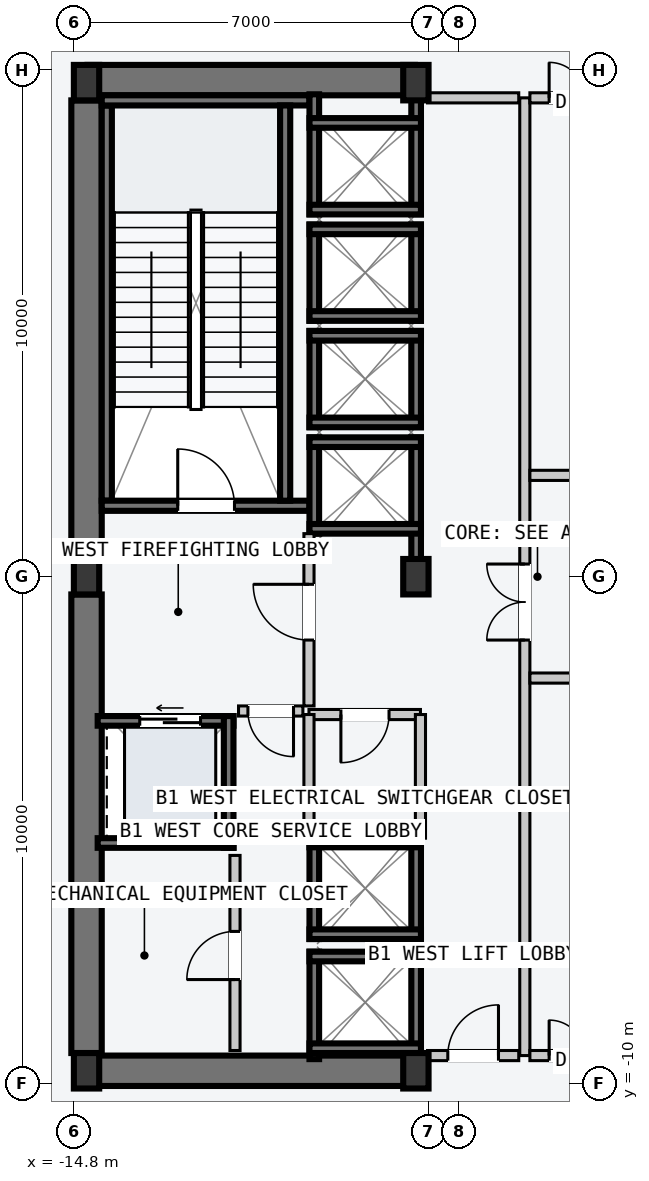
"""IFC4 building model, lengths in metres.
Left out: names, types, materials, properties, quantities, classifications, styles, units other than length and angle.
Written with IfcOpenShell. Run it as: python <this file> out.ifc"""

import sys

from ifc_helpers import new_model, si_unit, direction, frame, frame_2d, origin, origin_2d, place, context, subcontext, project, spatial, rectangle, i_section, extrude, element, fill, save


model = new_model("IFC4")
c1 = context("Model", 3, precision=1e-05, world=origin(), true_north=direction((0.0, 1.0)))
c2 = subcontext(c1, "Body", "Model", "MODEL_VIEW")
j1 = project(units=[si_unit("LENGTHUNIT", "METRE"), si_unit("PLANEANGLEUNIT", "RADIAN")], contexts=[c1])
p1 = place(None, origin())
s1 = spatial("IfcSite", under=j1, at=p1, CompositionType="ELEMENT")
p2 = place(p1, origin())
s2 = spatial("IfcBuilding", under=s1, at=p2, CompositionType="ELEMENT")
p3 = place(p2, frame((0.0, 0.0, -4.8)))
s3 = spatial("IfcBuildingStorey", under=s2, at=p3, CompositionType="ELEMENT", Elevation=-4.8)
for number, where, z_axis, x_axis in (
    (1, (-14.53, -9.75, -0.22), (0.0, 0.0, 1.0), (1.0, 0.0, 0.0)),
    (2, (-14.53, 9.8, -0.22), (0.0, 0.0, 1.0), (1.0, 0.0, 0.0)),
):
    element("IfcWall", number, at=place(p3, frame(where, z_axis=z_axis, x_axis=x_axis)), inside=s3, PredefinedType="SHEAR", context=c2, shape_type="SweptSolid", body=[
        extrude(rectangle(XDim=6.46, YDim=0.6, at=frame_2d((3.23, 0.0))), origin(), (0.0, 0.0, 1.0), 4.8),
    ])
for number, where, z_axis, x_axis in (
    (3, (-14.55, -9.4, -0.22), (0.0, 0.0, 1.0), (0.0, 1.0, 0.0)),
    (4, (-14.55, 0.35, -0.22), (0.0, 0.0, 1.0), (0.0, 1.0, 0.0)),
):
    element("IfcWall", number, at=place(p3, frame(where, z_axis=z_axis, x_axis=x_axis)), inside=s3, PredefinedType="SHEAR", context=c2, shape_type="SweptSolid", body=[
        extrude(rectangle(XDim=9.05, YDim=0.6, at=frame_2d((4.525, 0.0))), origin(), (0.0, 0.0, 1.0), 4.8),
    ])
p4 = place(p3, frame((-14.15, 1.5, -0.22), z_axis=(0.0, 0.0, 1.0), x_axis=(0.0, 1.0, 0.0)))
e5 = element("IfcWall", 5, at=p4, inside=s3, PredefinedType="SOLIDWALL", context=c2, shape_type="SweptSolid", body=[
    extrude(rectangle(XDim=7.8, YDim=0.2, at=frame_2d((3.9, 0.0))), origin(), (0.0, 0.0, 1.0), 4.8),
])
p5 = place(p3, frame((-14.25, 1.4, -0.22), z_axis=(0.0, 0.0, 1.0), x_axis=(1.0, 0.0, 0.0)))
e6 = element("IfcWall", 6, at=p5, inside=s3, PredefinedType="SOLIDWALL", context=c2, shape_type="SweptSolid", body=[
    extrude(rectangle(XDim=4.1, YDim=0.2, at=frame_2d((2.05, 0.0))), origin(), (0.0, 0.0, 1.0), 4.8),
])
p6 = place(p5, frame((1.5, 0.0, 0.22)))
e7 = element("IfcOpeningElement", 7, at=p6, cuts=e6, PredefinedType="OPENING", context=c2, shape_type="SweptSolid", body=[
    extrude(rectangle(XDim=1.12, YDim=2.18, at=frame_2d((0.56, 1.09))), frame((0.0, 0.11, 0.0), z_axis=(0.0, -1.0, 0.0), x_axis=(1.0, 0.0, 0.0)), (0.0, 0.0, 1.0), 0.22),
])
p7 = place(p3, frame((-14.25, 9.4, -0.22), z_axis=(0.0, 0.0, 1.0), x_axis=(1.0, 0.0, 0.0)))
e8 = element("IfcWall", 8, at=p7, inside=s3, PredefinedType="SOLIDWALL", context=c2, shape_type="SweptSolid", body=[
    extrude(rectangle(XDim=4.1, YDim=0.2, at=frame_2d((2.05, 0.0))), origin(), (0.0, 0.0, 1.0), 4.8),
])
p8 = place(p3, frame((-10.63, 1.5, -0.22), z_axis=(0.0, 0.0, 1.0), x_axis=(0.0, 1.0, 0.0)))
e9 = element("IfcWall", 9, at=p8, inside=s3, PredefinedType="SOLIDWALL", context=c2, shape_type="SweptSolid", body=[
    extrude(rectangle(XDim=7.8, YDim=0.2, at=frame_2d((3.9, 0.0))), origin(), (0.0, 0.0, 1.0), 4.8),
])
for number, where, z_axis, x_axis in (
    (10, (-14.55, -9.75, 0.0), (0.0, 0.0, 1.0), (1.0, 0.0, 0.0)),
    (11, (-14.55, 0.0, 0.0), (0.0, 0.0, 1.0), (1.0, 0.0, 0.0)),
    (12, (-14.55, 9.75, 0.0), (0.0, 0.0, 1.0), (1.0, 0.0, 0.0)),
    (13, (-8.05, -9.75, 0.0), (0.0, 0.0, 1.0), (1.0, 0.0, 0.0)),
    (14, (-8.05, 0.0, 0.0), (0.0, 0.0, 1.0), (1.0, 0.0, 0.0)),
    (15, (-8.05, 9.75, 0.0), (0.0, 0.0, 1.0), (1.0, 0.0, 0.0)),
):
    element("IfcColumn", number, at=place(p3, frame(where, z_axis=z_axis, x_axis=x_axis)), inside=s3, PredefinedType="COLUMN", context=c2, shape_type="SweptSolid", body=[
        extrude(i_section(OverallWidth=0.5, OverallDepth=0.7, WebThickness=0.028, FlangeThickness=0.045, at=origin_2d()), origin(), (0.0, 0.0, 1.0), 4.8),
    ])
p9 = place(p3, frame((-8.045, 0.21, -0.22), z_axis=(0.0, 0.0, 1.0), x_axis=(0.0, 1.0, 0.0)))
e16 = element("IfcWall", 16, at=p9, inside=s3, PredefinedType="SOLIDWALL", context=c2, shape_type="SweptSolid", body=[
    extrude(rectangle(XDim=2.54, YDim=0.19, at=frame_2d((1.27, 0.0))), origin(), (0.0, 0.0, 1.0), 4.8),
])
p10 = place(p3, frame((-10.055, 0.85, -0.22), z_axis=(0.0, 0.0, 1.0), x_axis=(0.0, 1.0, 0.0)))
e17 = element("IfcWall", 17, at=p10, inside=s3, PredefinedType="SOLIDWALL", context=c2, shape_type="SweptSolid", body=[
    extrude(rectangle(XDim=1.9, YDim=0.19, at=frame_2d((0.95, 0.0))), origin(), (0.0, 0.0, 1.0), 4.8),
])
for number, where, z_axis, x_axis in (
    (18, (-10.15, 2.655, -0.22), (0.0, 0.0, 1.0), (1.0, 0.0, 0.0)),
    (19, (-10.15, 0.945, -0.22), (0.0, 0.0, 1.0), (1.0, 0.0, 0.0)),
):
    element("IfcWall", number, at=place(p3, frame(where, z_axis=z_axis, x_axis=x_axis)), inside=s3, PredefinedType="SOLIDWALL", context=c2, shape_type="SweptSolid", body=[
        extrude(rectangle(XDim=2.2, YDim=0.19, at=frame_2d((1.1, 0.0))), origin(), (0.0, 0.0, 1.0), 4.8),
    ])
for number, where, z_axis, x_axis in (
    (20, (-8.045, 2.95, -0.22), (0.0, 0.0, 1.0), (0.0, 1.0, 0.0)),
    (21, (-10.055, 2.95, -0.22), (0.0, 0.0, 1.0), (0.0, 1.0, 0.0)),
):
    element("IfcWall", number, at=place(p3, frame(where, z_axis=z_axis, x_axis=x_axis)), inside=s3, PredefinedType="SOLIDWALL", context=c2, shape_type="SweptSolid", body=[
        extrude(rectangle(XDim=1.9, YDim=0.19, at=frame_2d((0.95, 0.0))), origin(), (0.0, 0.0, 1.0), 4.8),
    ])
for number, where, z_axis, x_axis in (
    (22, (-10.15, 4.755, -0.22), (0.0, 0.0, 1.0), (1.0, 0.0, 0.0)),
    (23, (-10.15, 3.045, -0.22), (0.0, 0.0, 1.0), (1.0, 0.0, 0.0)),
):
    element("IfcWall", number, at=place(p3, frame(where, z_axis=z_axis, x_axis=x_axis)), inside=s3, PredefinedType="SOLIDWALL", context=c2, shape_type="SweptSolid", body=[
        extrude(rectangle(XDim=2.2, YDim=0.19, at=frame_2d((1.1, 0.0))), origin(), (0.0, 0.0, 1.0), 4.8),
    ])
for number, where, z_axis, x_axis in (
    (24, (-8.045, 5.05, -0.22), (0.0, 0.0, 1.0), (0.0, 1.0, 0.0)),
    (25, (-10.055, 5.05, -0.22), (0.0, 0.0, 1.0), (0.0, 1.0, 0.0)),
):
    element("IfcWall", number, at=place(p3, frame(where, z_axis=z_axis, x_axis=x_axis)), inside=s3, PredefinedType="SOLIDWALL", context=c2, shape_type="SweptSolid", body=[
        extrude(rectangle(XDim=1.9, YDim=0.19, at=frame_2d((0.95, 0.0))), origin(), (0.0, 0.0, 1.0), 4.8),
    ])
for number, where, z_axis, x_axis in (
    (26, (-10.15, 6.855, -0.22), (0.0, 0.0, 1.0), (1.0, 0.0, 0.0)),
    (27, (-10.15, 5.145, -0.22), (0.0, 0.0, 1.0), (1.0, 0.0, 0.0)),
):
    element("IfcWall", number, at=place(p3, frame(where, z_axis=z_axis, x_axis=x_axis)), inside=s3, PredefinedType="SOLIDWALL", context=c2, shape_type="SweptSolid", body=[
        extrude(rectangle(XDim=2.2, YDim=0.19, at=frame_2d((1.1, 0.0))), origin(), (0.0, 0.0, 1.0), 4.8),
    ])
for number, where, z_axis, x_axis in (
    (28, (-8.045, 7.15, -0.22), (0.0, 0.0, 1.0), (0.0, 1.0, 0.0)),
    (29, (-10.055, 7.15, -0.22), (0.0, 0.0, 1.0), (0.0, 1.0, 0.0)),
):
    element("IfcWall", number, at=place(p3, frame(where, z_axis=z_axis, x_axis=x_axis)), inside=s3, PredefinedType="SOLIDWALL", context=c2, shape_type="SweptSolid", body=[
        extrude(rectangle(XDim=2.37, YDim=0.19, at=frame_2d((1.185, 0.0))), origin(), (0.0, 0.0, 1.0), 4.8),
    ])
for number, where, z_axis, x_axis in (
    (30, (-10.15, 8.955, -0.22), (0.0, 0.0, 1.0), (1.0, 0.0, 0.0)),
    (31, (-10.15, 7.245, -0.22), (0.0, 0.0, 1.0), (1.0, 0.0, 0.0)),
):
    element("IfcWall", number, at=place(p3, frame(where, z_axis=z_axis, x_axis=x_axis)), inside=s3, PredefinedType="SOLIDWALL", context=c2, shape_type="SweptSolid", body=[
        extrude(rectangle(XDim=2.2, YDim=0.19, at=frame_2d((1.1, 0.0))), origin(), (0.0, 0.0, 1.0), 4.8),
    ])
for number, where, z_axis, x_axis in (
    (32, (-8.045, -9.52, -0.22), (0.0, 0.0, 1.0), (0.0, 1.0, 0.0)),
    (33, (-10.055, -9.52, -0.22), (0.0, 0.0, 1.0), (0.0, 1.0, 0.0)),
):
    element("IfcWall", number, at=place(p3, frame(where, z_axis=z_axis, x_axis=x_axis)), inside=s3, PredefinedType="SOLIDWALL", context=c2, shape_type="SweptSolid", body=[
        extrude(rectangle(XDim=2.12, YDim=0.19, at=frame_2d((1.06, 0.0))), origin(), (0.0, 0.0, 1.0), 4.8),
    ])
for number, where, z_axis, x_axis in (
    (34, (-10.15, -7.495, -0.22), (0.0, 0.0, 1.0), (1.0, 0.0, 0.0)),
    (35, (-10.15, -9.305, -0.22), (0.0, 0.0, 1.0), (1.0, 0.0, 0.0)),
):
    element("IfcWall", number, at=place(p3, frame(where, z_axis=z_axis, x_axis=x_axis)), inside=s3, PredefinedType="SOLIDWALL", context=c2, shape_type="SweptSolid", body=[
        extrude(rectangle(XDim=2.2, YDim=0.19, at=frame_2d((1.1, 0.0))), origin(), (0.0, 0.0, 1.0), 4.8),
    ])
for number, where, z_axis, x_axis in (
    (36, (-8.045, -7.15, -0.22), (0.0, 0.0, 1.0), (0.0, 1.0, 0.0)),
    (37, (-10.055, -7.15, -0.22), (0.0, 0.0, 1.0), (0.0, 1.0, 0.0)),
):
    element("IfcWall", number, at=place(p3, frame(where, z_axis=z_axis, x_axis=x_axis)), inside=s3, PredefinedType="SOLIDWALL", context=c2, shape_type="SweptSolid", body=[
        extrude(rectangle(XDim=2.0, YDim=0.19, at=frame_2d((1.0, 0.0))), origin(), (0.0, 0.0, 1.0), 4.8),
    ])
for number, where, z_axis, x_axis in (
    (38, (-10.15, -5.245, -0.22), (0.0, 0.0, 1.0), (1.0, 0.0, 0.0)),
    (39, (-10.15, -7.055, -0.22), (0.0, 0.0, 1.0), (1.0, 0.0, 0.0)),
):
    element("IfcWall", number, at=place(p3, frame(where, z_axis=z_axis, x_axis=x_axis)), inside=s3, PredefinedType="SOLIDWALL", context=c2, shape_type="SweptSolid", body=[
        extrude(rectangle(XDim=2.2, YDim=0.19, at=frame_2d((1.1, 0.0))), origin(), (0.0, 0.0, 1.0), 4.8),
    ])
p11 = place(p3, frame((-14.33, -2.845, -0.22), z_axis=(0.0, 0.0, 1.0), x_axis=(1.0, 0.0, 0.0)))
e40 = element("IfcWall", 40, at=p11, inside=s3, PredefinedType="SOLIDWALL", context=c2, shape_type="SweptSolid", body=[
    extrude(rectangle(XDim=2.68, YDim=0.19, at=frame_2d((1.34, 0.0))), origin(), (0.0, 0.0, 1.0), 4.8),
])
p12 = place(p11, frame((0.83, 0.0, 0.22)))
e41 = element("IfcOpeningElement", 41, at=p12, cuts=e40, PredefinedType="OPENING", context=c2, shape_type="SweptSolid", body=[
    extrude(rectangle(XDim=1.2, YDim=2.2, at=frame_2d((0.6, 1.1))), frame((0.0, 0.105, 0.0), z_axis=(0.0, -1.0, 0.0), x_axis=(1.0, 0.0, 0.0)), (0.0, 0.0, 1.0), 0.21),
])
p13 = place(p3, frame((-14.33, -5.255, -0.22), z_axis=(0.0, 0.0, 1.0), x_axis=(1.0, 0.0, 0.0)))
e42 = element("IfcWall", 42, at=p13, inside=s3, PredefinedType="SOLIDWALL", context=c2, shape_type="SweptSolid", body=[
    extrude(rectangle(XDim=2.68, YDim=0.19, at=frame_2d((1.34, 0.0))), origin(), (0.0, 0.0, 1.0), 4.8),
])
p14 = place(p3, frame((-11.745, -5.35, -0.22), z_axis=(0.0, 0.0, 1.0), x_axis=(0.0, 1.0, 0.0)))
e43 = element("IfcWall", 43, at=p14, inside=s3, PredefinedType="SOLIDWALL", context=c2, shape_type="SweptSolid", body=[
    extrude(rectangle(XDim=2.6, YDim=0.19, at=frame_2d((1.3, 0.0))), origin(), (0.0, 0.0, 1.0), 4.8),
])
p15 = place(p3, frame((-5.9, -9.45, 0.0), z_axis=(0.0, 0.0, 1.0), x_axis=(0.0, 1.0, 0.0)))
e44 = element("IfcWall", 44, at=p15, inside=s3, PredefinedType="PARTITIONING", context=c2, shape_type="SweptSolid", body=[
    extrude(rectangle(XDim=18.9, YDim=0.2, at=frame_2d((9.45, 0.0))), origin(), (0.0, 0.0, 1.0), 4.58),
])
p16 = place(p15, frame((8.2, 0.0, 0.0)))
e45 = element("IfcOpeningElement", 45, at=p16, cuts=e44, PredefinedType="OPENING", context=c2, shape_type="SweptSolid", body=[
    extrude(rectangle(XDim=1.5, YDim=2.2, at=frame_2d((0.75, 1.1))), frame((0.0, 0.11, 0.0), z_axis=(0.0, -1.0, 0.0), x_axis=(1.0, 0.0, 0.0)), (0.0, 0.0, 1.0), 0.22),
])
p17 = place(p3, frame((-6.02, 9.45, 0.0), z_axis=(0.0, 0.0, 1.0), x_axis=(-1.0, 0.0, 0.0)))
e46 = element("IfcWall", 46, at=p17, inside=s3, PredefinedType="PARTITIONING", context=c2, shape_type="SweptSolid", body=[
    extrude(rectangle(XDim=1.8, YDim=0.2, at=frame_2d((0.9, 0.0))), origin(), (0.0, 0.0, 1.0), 4.58),
])
p18 = place(p3, frame((-10.16, -2.55, 0.0), z_axis=(0.0, 0.0, 1.0), x_axis=(0.0, 1.0, 0.0)))
e47 = element("IfcWall", 47, at=p18, inside=s3, PredefinedType="PARTITIONING", context=c2, shape_type="SweptSolid", body=[
    extrude(rectangle(XDim=3.4, YDim=0.2, at=frame_2d((1.7, 0.0))), origin(), (0.0, 0.0, 1.0), 4.58),
])
p19 = place(p18, frame((1.3, 0.0, 0.0)))
e48 = element("IfcOpeningElement", 48, at=p19, cuts=e47, PredefinedType="OPENING", context=c2, shape_type="SweptSolid", body=[
    extrude(rectangle(XDim=1.1, YDim=2.15, at=frame_2d((0.55, 1.075))), frame((0.0, 0.11, 0.0), z_axis=(0.0, -1.0, 0.0), x_axis=(1.0, 0.0, 0.0)), (0.0, 0.0, 1.0), 0.22),
])
p20 = place(p3, frame((-10.28, -2.65, 0.0), z_axis=(0.0, 0.0, 1.0), x_axis=(-1.0, 0.0, 0.0)))
e49 = element("IfcWall", 49, at=p20, inside=s3, PredefinedType="PARTITIONING", context=c2, shape_type="SweptSolid", body=[
    extrude(rectangle(XDim=1.27, YDim=0.2, at=frame_2d((0.635, 0.0))), origin(), (0.0, 0.0, 1.0), 4.58),
])
p21 = place(p20, frame((0.185, 0.0, 0.0)))
e50 = element("IfcOpeningElement", 50, at=p21, cuts=e49, PredefinedType="OPENING", context=c2, shape_type="SweptSolid", body=[
    extrude(rectangle(XDim=0.9, YDim=2.15, at=frame_2d((0.45, 1.075))), frame((0.0, 0.11, 0.0), z_axis=(0.0, -1.0, 0.0), x_axis=(1.0, 0.0, 0.0)), (0.0, 0.0, 1.0), 0.22),
])
p22 = place(p3, frame((-7.96, -2.72, 0.0), z_axis=(0.0, 0.0, 1.0), x_axis=(-1.0, 0.0, 0.0)))
e51 = element("IfcWall", 51, at=p22, inside=s3, PredefinedType="PARTITIONING", context=c2, shape_type="SweptSolid", body=[
    extrude(rectangle(XDim=2.2, YDim=0.2, at=frame_2d((1.1, 0.0))), origin(), (0.0, 0.0, 1.0), 4.58),
])
p23 = place(p22, frame((0.62, 0.0, 0.0)))
e52 = element("IfcOpeningElement", 52, at=p23, cuts=e51, PredefinedType="OPENING", context=c2, shape_type="SweptSolid", body=[
    extrude(rectangle(XDim=0.95, YDim=2.1, at=frame_2d((0.475, 1.05))), frame((0.0, 0.11, 0.0), z_axis=(0.0, -1.0, 0.0), x_axis=(1.0, 0.0, 0.0)), (0.0, 0.0, 1.0), 0.22),
])
for number, where, z_axis, x_axis in (
    (53, (-7.96, -5.16, 0.0), (0.0, 0.0, 1.0), (0.0, 1.0, 0.0)),
    (54, (-10.16, -5.16, 0.0), (0.0, 0.0, 1.0), (0.0, 1.0, 0.0)),
):
    element("IfcWall", number, at=place(p3, frame(where, z_axis=z_axis, x_axis=x_axis)), inside=s3, PredefinedType="PARTITIONING", context=c2, shape_type="SweptSolid", body=[
        extrude(rectangle(XDim=2.44, YDim=0.2, at=frame_2d((1.22, 0.0))), origin(), (0.0, 0.0, 1.0), 4.58),
    ])
p24 = place(p3, frame((-11.62, -9.35, 0.0), z_axis=(0.0, 0.0, 1.0), x_axis=(0.0, 1.0, 0.0)))
e55 = element("IfcWall", 55, at=p24, inside=s3, PredefinedType="PARTITIONING", context=c2, shape_type="SweptSolid", body=[
    extrude(rectangle(XDim=3.85, YDim=0.2, at=frame_2d((1.925, 0.0))), origin(), (0.0, 0.0, 1.0), 4.58),
])
p25 = place(p24, frame((1.4, 0.0, 0.0)))
e56 = element("IfcOpeningElement", 56, at=p25, cuts=e55, PredefinedType="OPENING", context=c2, shape_type="SweptSolid", body=[
    extrude(rectangle(XDim=0.95, YDim=2.1, at=frame_2d((0.475, 1.05))), frame((0.0, 0.11, 0.0), z_axis=(0.0, -1.0, 0.0), x_axis=(1.0, 0.0, 0.0)), (0.0, 0.0, 1.0), 0.22),
])
p26 = place(p3, frame((-7.82, -9.45, 0.0), z_axis=(0.0, 0.0, 1.0), x_axis=(1.0, 0.0, 0.0)))
e57 = element("IfcWall", 57, at=p26, inside=s3, PredefinedType="PARTITIONING", context=c2, shape_type="SweptSolid", body=[
    extrude(rectangle(XDim=1.8, YDim=0.2, at=frame_2d((0.9, 0.0))), origin(), (0.0, 0.0, 1.0), 4.58),
])
p27 = place(p26, frame((0.4, 0.0, 0.0)))
e58 = element("IfcOpeningElement", 58, at=p27, cuts=e57, PredefinedType="OPENING", context=c2, shape_type="SweptSolid", body=[
    extrude(rectangle(XDim=1.0, YDim=2.15, at=frame_2d((0.5, 1.075))), frame((0.0, 0.11, 0.0), z_axis=(0.0, -1.0, 0.0), x_axis=(1.0, 0.0, 0.0)), (0.0, 0.0, 1.0), 0.22),
])
p28 = place(p3, frame((-5.8, -9.45, 0.0), z_axis=(0.0, 0.0, 1.0), x_axis=(1.0, 0.0, 0.0)))
e59 = element("IfcWall", 59, at=p28, inside=s3, PredefinedType="PARTITIONING", context=c2, shape_type="SweptSolid", body=[
    extrude(rectangle(XDim=11.6, YDim=0.2, at=frame_2d((5.8, 0.0))), origin(), (0.0, 0.0, 1.0), 4.58),
])
p29 = place(p28, frame((0.38, 0.0, 0.0)))
e60 = element("IfcOpeningElement", 60, at=p29, cuts=e59, PredefinedType="OPENING", context=c2, shape_type="SweptSolid", body=[
    extrude(rectangle(XDim=1.4, YDim=2.25, at=frame_2d((0.7, 1.125))), frame((0.0, 0.11, 0.0), z_axis=(0.0, -1.0, 0.0), x_axis=(1.0, 0.0, 0.0)), (0.0, 0.0, 1.0), 0.22),
])
for number, where, z_axis, x_axis in (
    (61, (-5.8, -2.0, 0.0), (0.0, 0.0, 1.0), (1.0, 0.0, 0.0)),
    (62, (-5.8, 2.0, 0.0), (0.0, 0.0, 1.0), (1.0, 0.0, 0.0)),
):
    element("IfcWall", number, at=place(p3, frame(where, z_axis=z_axis, x_axis=x_axis)), inside=s3, PredefinedType="PARTITIONING", context=c2, shape_type="SweptSolid", body=[
        extrude(rectangle(XDim=11.6, YDim=0.2, at=frame_2d((5.8, 0.0))), origin(), (0.0, 0.0, 1.0), 4.58),
    ])
p30 = place(p3, frame((-5.8, 9.45, 0.0), z_axis=(0.0, 0.0, 1.0), x_axis=(1.0, 0.0, 0.0)))
e63 = element("IfcWall", 63, at=p30, inside=s3, PredefinedType="PARTITIONING", context=c2, shape_type="SweptSolid", body=[
    extrude(rectangle(XDim=11.6, YDim=0.2, at=frame_2d((5.8, 0.0))), origin(), (0.0, 0.0, 1.0), 4.58),
])
p31 = place(p30, frame((0.38, 0.0, 0.0)))
e64 = element("IfcOpeningElement", 64, at=p31, cuts=e63, PredefinedType="OPENING", context=c2, shape_type="SweptSolid", body=[
    extrude(rectangle(XDim=1.4, YDim=2.25, at=frame_2d((0.7, 1.125))), frame((0.0, 0.11, 0.0), z_axis=(0.0, -1.0, 0.0), x_axis=(1.0, 0.0, 0.0)), (0.0, 0.0, 1.0), 0.22),
])
p32 = place(p6, origin())
e65 = element("IfcDoor", 65, at=p32, inside=s3, OperationType="SINGLE_SWING_LEFT", PredefinedType="DOOR", context=c2, shape_type="SweptSolid", body=[
    extrude(rectangle(XDim=1.12, YDim=2.18, at=frame_2d((0.56, 1.09))), frame((0.0, 0.025, 0.0), z_axis=(0.0, -1.0, 0.0), x_axis=(1.0, 0.0, 0.0)), (0.0, 0.0, 1.0), 0.05),
])
fill(e7, e65)
p33 = place(p12, origin())
e66 = element("IfcDoor", 66, at=p33, inside=s3, OperationType="SLIDING_TO_LEFT", PredefinedType="DOOR", context=c2, shape_type="SweptSolid", body=[
    extrude(rectangle(XDim=1.2, YDim=2.2, at=frame_2d((0.6, 1.1))), frame((0.0, 0.025, 0.0), z_axis=(0.0, -1.0, 0.0), x_axis=(1.0, 0.0, 0.0)), (0.0, 0.0, 1.0), 0.05),
])
fill(e41, e66)
p34 = place(p16, origin())
e67 = element("IfcDoor", 67, at=p34, inside=s3, OperationType="DOUBLE_DOOR_SINGLE_SWING", PredefinedType="DOOR", context=c2, shape_type="SweptSolid", body=[
    extrude(rectangle(XDim=1.5, YDim=2.2, at=frame_2d((0.75, 1.1))), frame((0.0, 0.025, 0.0), z_axis=(0.0, -1.0, 0.0), x_axis=(1.0, 0.0, 0.0)), (0.0, 0.0, 1.0), 0.05),
])
fill(e45, e67)
p35 = place(p19, origin())
e68 = element("IfcDoor", 68, at=p35, inside=s3, OperationType="SINGLE_SWING_RIGHT", PredefinedType="DOOR", context=c2, shape_type="SweptSolid", body=[
    extrude(rectangle(XDim=1.1, YDim=2.15, at=frame_2d((0.55, 1.075))), frame((0.0, 0.025, 0.0), z_axis=(0.0, -1.0, 0.0), x_axis=(1.0, 0.0, 0.0)), (0.0, 0.0, 1.0), 0.05),
])
fill(e48, e68)
p36 = place(p21, origin())
e69 = element("IfcDoor", 69, at=p36, inside=s3, OperationType="SINGLE_SWING_LEFT", PredefinedType="DOOR", context=c2, shape_type="SweptSolid", body=[
    extrude(rectangle(XDim=0.9, YDim=2.15, at=frame_2d((0.45, 1.075))), frame((0.0, 0.025, 0.0), z_axis=(0.0, -1.0, 0.0), x_axis=(1.0, 0.0, 0.0)), (0.0, 0.0, 1.0), 0.05),
])
fill(e50, e69)
p37 = place(p23, origin())
e70 = element("IfcDoor", 70, at=p37, inside=s3, OperationType="SINGLE_SWING_RIGHT", PredefinedType="DOOR", context=c2, shape_type="SweptSolid", body=[
    extrude(rectangle(XDim=0.95, YDim=2.1, at=frame_2d((0.475, 1.05))), frame((0.0, 0.025, 0.0), z_axis=(0.0, -1.0, 0.0), x_axis=(1.0, 0.0, 0.0)), (0.0, 0.0, 1.0), 0.05),
])
fill(e52, e70)
p38 = place(p25, origin())
e71 = element("IfcDoor", 71, at=p38, inside=s3, OperationType="SINGLE_SWING_LEFT", PredefinedType="DOOR", context=c2, shape_type="SweptSolid", body=[
    extrude(rectangle(XDim=0.95, YDim=2.1, at=frame_2d((0.475, 1.05))), frame((0.0, 0.025, 0.0), z_axis=(0.0, -1.0, 0.0), x_axis=(1.0, 0.0, 0.0)), (0.0, 0.0, 1.0), 0.05),
])
fill(e56, e71)
p39 = place(p27, origin())
e72 = element("IfcDoor", 72, at=p39, inside=s3, OperationType="SINGLE_SWING_RIGHT", PredefinedType="DOOR", context=c2, shape_type="SweptSolid", body=[
    extrude(rectangle(XDim=1.0, YDim=2.15, at=frame_2d((0.5, 1.075))), frame((0.0, 0.025, 0.0), z_axis=(0.0, -1.0, 0.0), x_axis=(1.0, 0.0, 0.0)), (0.0, 0.0, 1.0), 0.05),
])
fill(e58, e72)
p40 = place(p29, origin())
e73 = element("IfcDoor", 73, at=p40, inside=s3, OperationType="DOUBLE_DOOR_SINGLE_SWING", PredefinedType="DOOR", context=c2, shape_type="SweptSolid", body=[
    extrude(rectangle(XDim=1.4, YDim=2.25, at=frame_2d((0.7, 1.125))), frame((0.0, 0.025, 0.0), z_axis=(0.0, -1.0, 0.0), x_axis=(1.0, 0.0, 0.0)), (0.0, 0.0, 1.0), 0.05),
])
fill(e60, e73)
p41 = place(p31, origin())
e74 = element("IfcDoor", 74, at=p41, inside=s3, OperationType="DOUBLE_DOOR_SINGLE_SWING", PredefinedType="DOOR", context=c2, shape_type="SweptSolid", body=[
    extrude(rectangle(XDim=1.4, YDim=2.25, at=frame_2d((0.7, 1.125))), frame((0.0, 0.025, 0.0), z_axis=(0.0, -1.0, 0.0), x_axis=(1.0, 0.0, 0.0)), (0.0, 0.0, 1.0), 0.05),
])
fill(e64, e74)
save(model, sys.argv[1])
